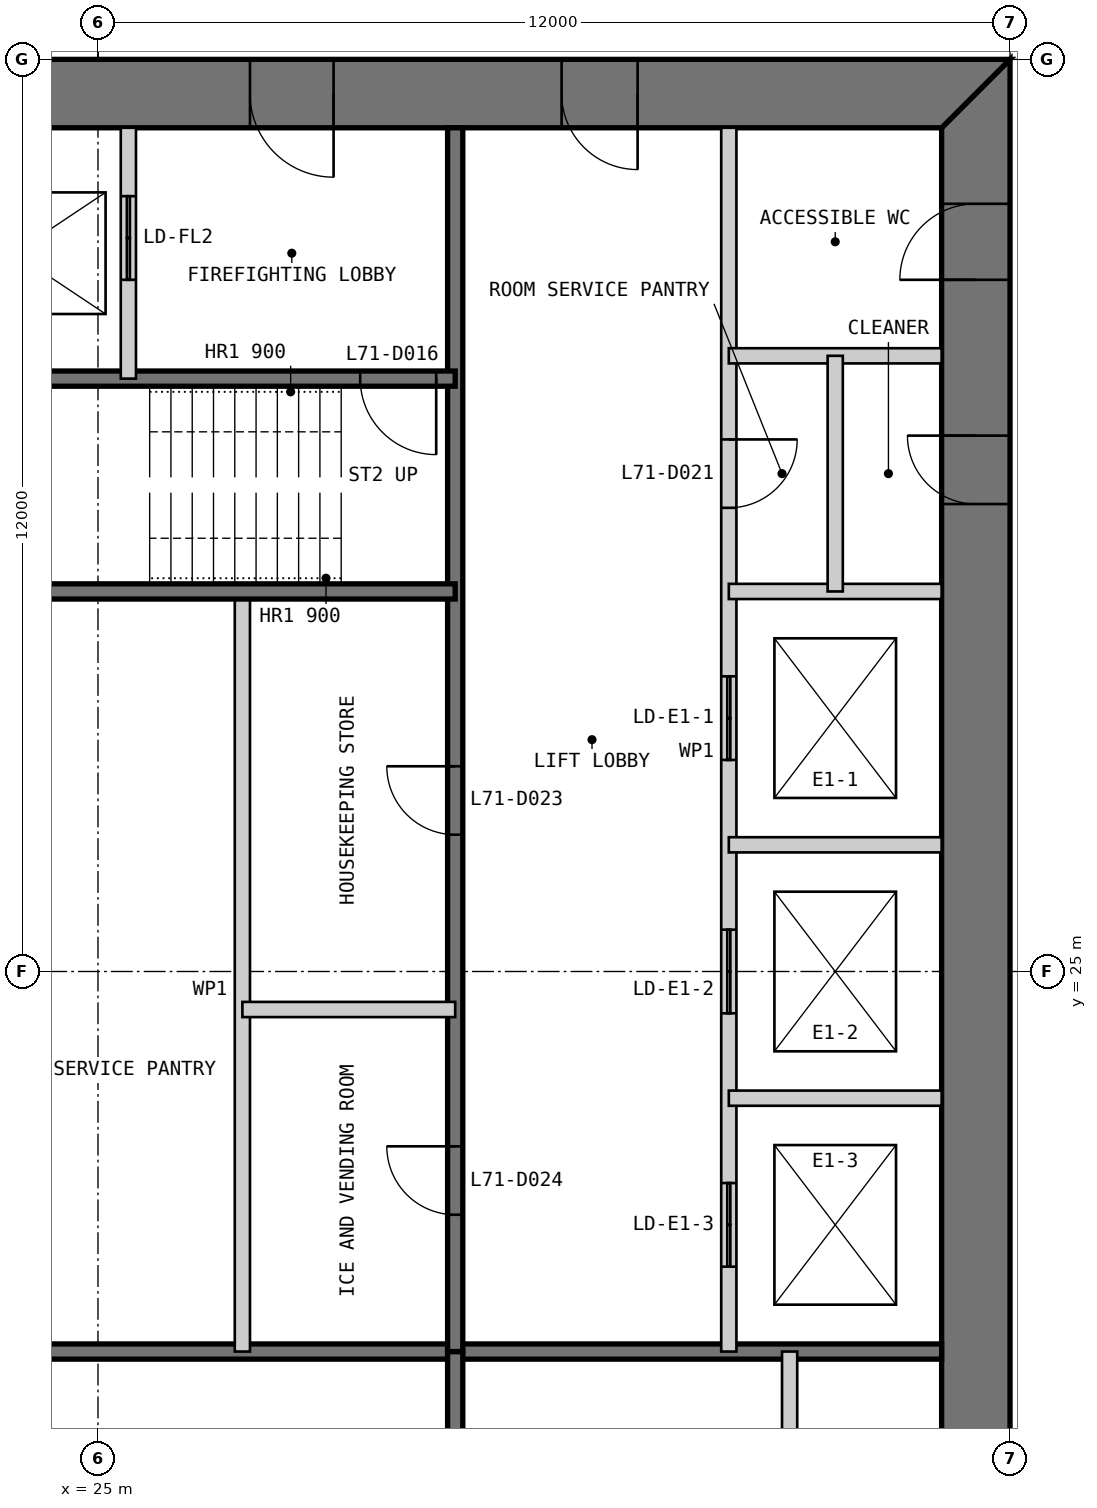
"""IFC4 building model, lengths in metres.
Left out: names, types, materials, properties, quantities, classifications, styles, units other than length and angle.
Written with IfcOpenShell. Run it as: python <this file> out.ifc"""

import sys

from ifc_helpers import new_model, si_unit, direction, frame, frame_2d, origin, place, context, subcontext, project, spatial, polyline, rectangle, outline, extrude, element, fill, save


model = new_model("IFC4")
c1 = context("Model", 3, precision=1e-05, world=origin(), true_north=direction((0.0, 1.0)))
c2 = subcontext(c1, "Body", "Model", "MODEL_VIEW")
j1 = project(units=[si_unit("LENGTHUNIT", "METRE"), si_unit("PLANEANGLEUNIT", "RADIAN")], contexts=[c1])
p1 = place(None, origin())
s1 = spatial("IfcSite", under=j1, at=p1, CompositionType="ELEMENT")
p2 = place(p1, origin())
s2 = spatial("IfcBuilding", under=s1, at=p2, CompositionType="ELEMENT")
p3 = place(p2, frame((0.0, 0.0, 293.4)))
s3 = spatial("IfcBuildingStorey", under=s2, at=p3, CompositionType="ELEMENT", Elevation=293.4)
p4 = place(p3, frame((36.55, 13.9, 0.0), z_axis=(0.0, 0.0, 1.0), x_axis=(0.0, 1.0, 0.0)))
e1 = element("IfcWall", 1, at=p4, inside=s3, PredefinedType="SHEAR", context=c2, shape_type="SweptSolid", body=[
    extrude(outline(polyline([(-0.9, -0.45), (23.1, -0.45), (22.2, 0.45), (0.0, 0.45), (-0.9, -0.45)])), origin(), (0.0, 0.0, 1.0), 3.4),
])
p5 = place(p4, frame((20.2, 0.0, 0.0)))
e2 = element("IfcOpeningElement", 2, at=p5, cuts=e1, PredefinedType="OPENING", context=c2, shape_type="SweptSolid", body=[
    extrude(rectangle(XDim=1.0, YDim=2.2, at=frame_2d((0.5, 1.1))), frame((0.0, 0.46, 0.0), z_axis=(0.0, -1.0, 0.0), x_axis=(1.0, 0.0, 0.0)), (0.0, 0.0, 1.0), 0.92),
])
p6 = place(p4, frame((17.25, 0.0, 0.0)))
e3 = element("IfcOpeningElement", 3, at=p6, cuts=e1, PredefinedType="OPENING", context=c2, shape_type="SweptSolid", body=[
    extrude(rectangle(XDim=0.9, YDim=2.2, at=frame_2d((0.45, 1.1))), frame((0.0, 0.46, 0.0), z_axis=(0.0, -1.0, 0.0), x_axis=(1.0, 0.0, 0.0)), (0.0, 0.0, 1.0), 0.92),
])
p7 = place(p3, frame((37.0, 36.55, 0.0), z_axis=(0.0, 0.0, 1.0), x_axis=(-1.0, 0.0, 0.0)))
e4 = element("IfcWall", 4, at=p7, inside=s3, PredefinedType="SHEAR", context=c2, shape_type="SweptSolid", body=[
    extrude(outline(polyline([(0.0, -0.45), (24.0, -0.45), (23.1, 0.45), (0.9, 0.45), (0.0, -0.45)])), origin(), (0.0, 0.0, 1.0), 3.4),
])
p8 = place(p7, frame((4.9, 0.0, 0.0)))
e5 = element("IfcOpeningElement", 5, at=p8, cuts=e4, PredefinedType="OPENING", context=c2, shape_type="SweptSolid", body=[
    extrude(rectangle(XDim=1.0, YDim=2.2, at=frame_2d((0.5, 1.1))), frame((0.0, 0.46, 0.0), z_axis=(0.0, -1.0, 0.0), x_axis=(1.0, 0.0, 0.0)), (0.0, 0.0, 1.0), 0.92),
])
p9 = place(p7, frame((8.9, 0.0, 0.0)))
e6 = element("IfcOpeningElement", 6, at=p9, cuts=e4, PredefinedType="OPENING", context=c2, shape_type="SweptSolid", body=[
    extrude(rectangle(XDim=1.1, YDim=2.2, at=frame_2d((0.55, 1.1))), frame((0.0, 0.46, 0.0), z_axis=(0.0, -1.0, 0.0), x_axis=(1.0, 0.0, 0.0)), (0.0, 0.0, 1.0), 0.92),
])
p10 = place(p7, frame((15.05, 0.0, 0.0)))
e7 = element("IfcOpeningElement", 7, at=p10, cuts=e4, PredefinedType="OPENING", context=c2, shape_type="SweptSolid", body=[
    extrude(rectangle(XDim=0.9, YDim=2.2, at=frame_2d((0.45, 1.1))), frame((0.0, 0.46, 0.0), z_axis=(0.0, -1.0, 0.0), x_axis=(1.0, 0.0, 0.0)), (0.0, 0.0, 1.0), 0.92),
])
p11 = place(p7, frame((17.9, 0.0, 0.0)))
e8 = element("IfcOpeningElement", 8, at=p11, cuts=e4, PredefinedType="OPENING", context=c2, shape_type="SweptSolid", body=[
    extrude(rectangle(XDim=1.0, YDim=2.2, at=frame_2d((0.5, 1.1))), frame((0.0, 0.46, 0.0), z_axis=(0.0, -1.0, 0.0), x_axis=(1.0, 0.0, 0.0)), (0.0, 0.0, 1.0), 0.92),
])
p12 = place(p7, frame((21.4, 0.0, 0.0)))
e9 = element("IfcOpeningElement", 9, at=p12, cuts=e4, PredefinedType="OPENING", context=c2, shape_type="SweptSolid", body=[
    extrude(rectangle(XDim=1.0, YDim=2.2, at=frame_2d((0.5, 1.1))), frame((0.0, 0.46, 0.0), z_axis=(0.0, -1.0, 0.0), x_axis=(1.0, 0.0, 0.0)), (0.0, 0.0, 1.0), 0.92),
])
p13 = place(p3, frame((20.3, 20.0, 0.0), z_axis=(0.0, 0.0, 1.0), x_axis=(1.0, 0.0, 0.0)))
e10 = element("IfcWall", 10, at=p13, inside=s3, PredefinedType="SOLIDWALL", context=c2, shape_type="SweptSolid", body=[
    extrude(rectangle(XDim=15.8, YDim=0.2, at=frame_2d((7.9, 0.0))), origin(), (0.0, 0.0, 1.0), 3.2),
])
p14 = place(p3, frame((29.7, 13.9, 0.0), z_axis=(0.0, 0.0, 1.0), x_axis=(0.0, 1.0, 0.0)))
e11 = element("IfcWall", 11, at=p14, inside=s3, PredefinedType="SOLIDWALL", context=c2, shape_type="SweptSolid", body=[
    extrude(rectangle(XDim=6.1, YDim=0.2, at=frame_2d((3.05, 0.0))), origin(), (0.0, 0.0, 1.0), 3.2),
])
p15 = place(p3, frame((34.1, 13.9, 0.0), z_axis=(0.0, 0.0, 1.0), x_axis=(0.0, 1.0, 0.0)))
e12 = element("IfcWall", 12, at=p15, inside=s3, PredefinedType="PARTITIONING", context=c2, shape_type="SweptSolid", body=[
    extrude(rectangle(XDim=6.1, YDim=0.2, at=frame_2d((3.05, 0.0))), origin(), (0.0, 0.0, 1.0), 3.2),
])
p16 = place(p3, frame((33.3, 36.1, 0.0), z_axis=(0.0, 0.0, 1.0), x_axis=(0.0, -1.0, 0.0)))
e13 = element("IfcWall", 13, at=p16, inside=s3, PredefinedType="PARTITIONING", context=c2, shape_type="SweptSolid", body=[
    extrude(rectangle(XDim=16.1, YDim=0.2, at=frame_2d((8.05, 0.0))), origin(), (0.0, 0.0, 1.0), 3.2),
])
p17 = place(p16, frame((4.1, 0.0, 0.0)))
e14 = element("IfcOpeningElement", 14, at=p17, cuts=e13, PredefinedType="OPENING", context=c2, shape_type="SweptSolid", body=[
    extrude(rectangle(XDim=0.9, YDim=2.2, at=frame_2d((0.45, 1.1))), frame((0.0, 0.11, 0.0), z_axis=(0.0, -1.0, 0.0), x_axis=(1.0, 0.0, 0.0)), (0.0, 0.0, 1.0), 0.22),
])
p18 = place(p16, frame((7.217, 0.0, 0.0)))
e15 = element("IfcOpeningElement", 15, at=p18, cuts=e13, PredefinedType="OPENING", context=c2, shape_type="SweptSolid", body=[
    extrude(rectangle(XDim=1.1, YDim=2.2, at=frame_2d((0.55, 1.1))), frame((0.0, 0.11, 0.0), z_axis=(0.0, -1.0, 0.0), x_axis=(1.0, 0.0, 0.0)), (0.0, 0.0, 1.0), 0.22),
])
p19 = place(p16, frame((10.55, 0.0, 0.0)))
e16 = element("IfcOpeningElement", 16, at=p19, cuts=e13, PredefinedType="OPENING", context=c2, shape_type="SweptSolid", body=[
    extrude(rectangle(XDim=1.1, YDim=2.2, at=frame_2d((0.55, 1.1))), frame((0.0, 0.11, 0.0), z_axis=(0.0, -1.0, 0.0), x_axis=(1.0, 0.0, 0.0)), (0.0, 0.0, 1.0), 0.22),
])
p20 = place(p16, frame((13.883, 0.0, 0.0)))
e17 = element("IfcOpeningElement", 17, at=p20, cuts=e13, PredefinedType="OPENING", context=c2, shape_type="SweptSolid", body=[
    extrude(rectangle(XDim=1.1, YDim=2.2, at=frame_2d((0.55, 1.1))), frame((0.0, 0.11, 0.0), z_axis=(0.0, -1.0, 0.0), x_axis=(1.0, 0.0, 0.0)), (0.0, 0.0, 1.0), 0.22),
])
p21 = place(p3, frame((29.7, 36.1, 0.0), z_axis=(0.0, 0.0, 1.0), x_axis=(0.0, -1.0, 0.0)))
e18 = element("IfcWall", 18, at=p21, inside=s3, PredefinedType="SOLIDWALL", context=c2, shape_type="SweptSolid", body=[
    extrude(rectangle(XDim=16.1, YDim=0.2, at=frame_2d((8.05, 0.0))), origin(), (0.0, 0.0, 1.0), 3.2),
])
p22 = place(p21, frame((8.4, 0.0, 0.0)))
e19 = element("IfcOpeningElement", 19, at=p22, cuts=e18, PredefinedType="OPENING", context=c2, shape_type="SweptSolid", body=[
    extrude(rectangle(XDim=0.9, YDim=2.2, at=frame_2d((0.45, 1.1))), frame((0.0, 0.11, 0.0), z_axis=(0.0, -1.0, 0.0), x_axis=(1.0, 0.0, 0.0)), (0.0, 0.0, 1.0), 0.22),
])
p23 = place(p21, frame((13.4, 0.0, 0.0)))
e20 = element("IfcOpeningElement", 20, at=p23, cuts=e18, PredefinedType="OPENING", context=c2, shape_type="SweptSolid", body=[
    extrude(rectangle(XDim=0.9, YDim=2.2, at=frame_2d((0.45, 1.1))), frame((0.0, 0.11, 0.0), z_axis=(0.0, -1.0, 0.0), x_axis=(1.0, 0.0, 0.0)), (0.0, 0.0, 1.0), 0.22),
])
for number, where, z_axis, x_axis in (
    (21, (36.1, 30.0, 0.0), (0.0, 0.0, 1.0), (-1.0, 0.0, 0.0)),
    (22, (36.1, 26.667, 0.0), (0.0, 0.0, 1.0), (-1.0, 0.0, 0.0)),
    (23, (36.1, 23.333, 0.0), (0.0, 0.0, 1.0), (-1.0, 0.0, 0.0)),
):
    element("IfcWall", number, at=place(p3, frame(where, z_axis=z_axis, x_axis=x_axis)), inside=s3, PredefinedType="PARTITIONING", context=c2, shape_type="SweptSolid", body=[
        extrude(rectangle(XDim=2.8, YDim=0.2, at=frame_2d((1.4, 0.0))), origin(), (0.0, 0.0, 1.0), 3.2),
    ])
p24 = place(p3, frame((26.9, 30.0, 0.0), z_axis=(0.0, 0.0, 1.0), x_axis=(0.0, -1.0, 0.0)))
e24 = element("IfcWall", 24, at=p24, inside=s3, PredefinedType="PARTITIONING", context=c2, shape_type="SweptSolid", body=[
    extrude(rectangle(XDim=10.0, YDim=0.2, at=frame_2d((5.0, 0.0))), origin(), (0.0, 0.0, 1.0), 3.2),
])
p25 = place(p3, frame((29.7, 32.8, 0.0), z_axis=(0.0, 0.0, 1.0), x_axis=(-1.0, 0.0, 0.0)))
e25 = element("IfcWall", 25, at=p25, inside=s3, PredefinedType="SOLIDWALL", context=c2, shape_type="SweptSolid", body=[
    extrude(rectangle(XDim=9.4, YDim=0.2, at=frame_2d((4.7, 0.0))), origin(), (0.0, 0.0, 1.0), 3.2),
])
p26 = place(p25, frame((0.25, 0.0, 0.0)))
e26 = element("IfcOpeningElement", 26, at=p26, cuts=e25, PredefinedType="OPENING", context=c2, shape_type="SweptSolid", body=[
    extrude(rectangle(XDim=1.0, YDim=2.2, at=frame_2d((0.5, 1.1))), frame((0.0, 0.11, 0.0), z_axis=(0.0, -1.0, 0.0), x_axis=(1.0, 0.0, 0.0)), (0.0, 0.0, 1.0), 0.22),
])
p27 = place(p3, frame((29.7, 30.0, 0.0), z_axis=(0.0, 0.0, 1.0), x_axis=(-1.0, 0.0, 0.0)))
e27 = element("IfcWall", 27, at=p27, inside=s3, PredefinedType="SOLIDWALL", context=c2, shape_type="SweptSolid", body=[
    extrude(rectangle(XDim=15.8, YDim=0.2, at=frame_2d((7.9, 0.0))), origin(), (0.0, 0.0, 1.0), 3.2),
])
p28 = place(p3, frame((25.4, 36.1, 0.0), z_axis=(0.0, 0.0, 1.0), x_axis=(0.0, -1.0, 0.0)))
e28 = element("IfcWall", 28, at=p28, inside=s3, PredefinedType="PARTITIONING", context=c2, shape_type="SweptSolid", body=[
    extrude(rectangle(XDim=3.3, YDim=0.2, at=frame_2d((1.65, 0.0))), origin(), (0.0, 0.0, 1.0), 3.2),
])
p29 = place(p28, frame((0.9, 0.0, 0.0)))
e29 = element("IfcOpeningElement", 29, at=p29, cuts=e28, PredefinedType="OPENING", context=c2, shape_type="SweptSolid", body=[
    extrude(rectangle(XDim=1.1, YDim=2.2, at=frame_2d((0.55, 1.1))), frame((0.0, 0.11, 0.0), z_axis=(0.0, -1.0, 0.0), x_axis=(1.0, 0.0, 0.0)), (0.0, 0.0, 1.0), 0.22),
])
p30 = place(p3, frame((36.1, 33.1, 0.0), z_axis=(0.0, 0.0, 1.0), x_axis=(-1.0, 0.0, 0.0)))
e30 = element("IfcWall", 30, at=p30, inside=s3, PredefinedType="PARTITIONING", context=c2, shape_type="SweptSolid", body=[
    extrude(rectangle(XDim=2.8, YDim=0.2, at=frame_2d((1.4, 0.0))), origin(), (0.0, 0.0, 1.0), 3.2),
])
p31 = place(p3, frame((34.7, 33.1, 0.0), z_axis=(0.0, 0.0, 1.0), x_axis=(0.0, -1.0, 0.0)))
e31 = element("IfcWall", 31, at=p31, inside=s3, PredefinedType="PARTITIONING", context=c2, shape_type="SweptSolid", body=[
    extrude(rectangle(XDim=3.1, YDim=0.2, at=frame_2d((1.55, 0.0))), origin(), (0.0, 0.0, 1.0), 3.2),
])
p32 = place(p3, frame((29.7, 24.5, 0.0), z_axis=(0.0, 0.0, 1.0), x_axis=(-1.0, 0.0, 0.0)))
e32 = element("IfcWall", 32, at=p32, inside=s3, PredefinedType="PARTITIONING", context=c2, shape_type="SweptSolid", body=[
    extrude(rectangle(XDim=2.8, YDim=0.2, at=frame_2d((1.4, 0.0))), origin(), (0.0, 0.0, 1.0), 3.2),
])
p33 = place(p8, origin())
e33 = element("IfcDoor", 33, at=p33, inside=s3, OperationType="SINGLE_SWING_LEFT", PredefinedType="DOOR", context=c2, shape_type="SweptSolid", body=[
    extrude(rectangle(XDim=1.0, YDim=2.2, at=frame_2d((0.5, 1.1))), frame((0.0, 0.025, 0.0), z_axis=(0.0, -1.0, 0.0), x_axis=(1.0, 0.0, 0.0)), (0.0, 0.0, 1.0), 0.05),
    extrude(outline(polyline([(0.0, 0.0), (0.04, 0.0), (0.04, 2.16), (0.96, 2.16), (0.96, 0.0), (1.0, 0.0), (1.0, 2.2), (0.0, 2.2), (0.0, 0.0)])), frame((0.0, 0.3, 0.0), z_axis=(0.0, -1.0, 0.0), x_axis=(1.0, 0.0, 0.0)), (0.0, 0.0, 1.0), 0.6),
])
fill(e5, e33)
p34 = place(p9, origin())
e34 = element("IfcDoor", 34, at=p34, inside=s3, OperationType="SINGLE_SWING_LEFT", PredefinedType="DOOR", context=c2, shape_type="SweptSolid", body=[
    extrude(rectangle(XDim=1.1, YDim=2.2, at=frame_2d((0.55, 1.1))), frame((0.0, 0.025, 0.0), z_axis=(0.0, -1.0, 0.0), x_axis=(1.0, 0.0, 0.0)), (0.0, 0.0, 1.0), 0.05),
    extrude(outline(polyline([(0.0, 0.0), (0.04, 0.0), (0.04, 2.16), (1.06, 2.16), (1.06, 0.0), (1.1, 0.0), (1.1, 2.2), (0.0, 2.2), (0.0, 0.0)])), frame((0.0, 0.3, 0.0), z_axis=(0.0, -1.0, 0.0), x_axis=(1.0, 0.0, 0.0)), (0.0, 0.0, 1.0), 0.6),
])
fill(e6, e34)
p35 = place(p26, origin())
e35 = element("IfcDoor", 35, at=p35, inside=s3, OperationType="SINGLE_SWING_LEFT", PredefinedType="DOOR", context=c2, shape_type="SweptSolid", body=[
    extrude(rectangle(XDim=1.0, YDim=2.2, at=frame_2d((0.5, 1.1))), frame((0.0, 0.025, 0.0), z_axis=(0.0, -1.0, 0.0), x_axis=(1.0, 0.0, 0.0)), (0.0, 0.0, 1.0), 0.05),
])
fill(e26, e35)
p36 = place(p5, origin())
e36 = element("IfcDoor", 36, at=p36, inside=s3, OperationType="SINGLE_SWING_LEFT", PredefinedType="DOOR", context=c2, shape_type="SweptSolid", body=[
    extrude(rectangle(XDim=1.0, YDim=2.2, at=frame_2d((0.5, 1.1))), frame((0.0, 0.025, 0.0), z_axis=(0.0, -1.0, 0.0), x_axis=(1.0, 0.0, 0.0)), (0.0, 0.0, 1.0), 0.05),
    extrude(outline(polyline([(0.0, 0.0), (0.04, 0.0), (0.04, 2.16), (0.96, 2.16), (0.96, 0.0), (1.0, 0.0), (1.0, 2.2), (0.0, 2.2), (0.0, 0.0)])), frame((0.0, 0.3, 0.0), z_axis=(0.0, -1.0, 0.0), x_axis=(1.0, 0.0, 0.0)), (0.0, 0.0, 1.0), 0.6),
])
fill(e2, e36)
p37 = place(p17, origin())
e37 = element("IfcDoor", 37, at=p37, inside=s3, OperationType="SINGLE_SWING_LEFT", PredefinedType="DOOR", context=c2, shape_type="SweptSolid", body=[
    extrude(rectangle(XDim=0.9, YDim=2.2, at=frame_2d((0.45, 1.1))), frame((0.0, 0.025, 0.0), z_axis=(0.0, -1.0, 0.0), x_axis=(1.0, 0.0, 0.0)), (0.0, 0.0, 1.0), 0.05),
])
fill(e14, e37)
p38 = place(p6, origin())
e38 = element("IfcDoor", 38, at=p38, inside=s3, OperationType="SINGLE_SWING_RIGHT", PredefinedType="DOOR", context=c2, shape_type="SweptSolid", body=[
    extrude(rectangle(XDim=0.9, YDim=2.2, at=frame_2d((0.45, 1.1))), frame((0.0, 0.025, 0.0), z_axis=(0.0, -1.0, 0.0), x_axis=(1.0, 0.0, 0.0)), (0.0, 0.0, 1.0), 0.05),
    extrude(outline(polyline([(0.0, 0.0), (0.04, 0.0), (0.04, 2.16), (0.86, 2.16), (0.86, 0.0), (0.9, 0.0), (0.9, 2.2), (0.0, 2.2), (0.0, 0.0)])), frame((0.0, 0.3, 0.0), z_axis=(0.0, -1.0, 0.0), x_axis=(1.0, 0.0, 0.0)), (0.0, 0.0, 1.0), 0.6),
])
fill(e3, e38)
p39 = place(p22, frame((0.9, 0.0, 0.0), z_axis=(0.0, 0.0, 1.0), x_axis=(-1.0, 0.0, 0.0)))
e39 = element("IfcDoor", 39, at=p39, inside=s3, OperationType="SINGLE_SWING_RIGHT", PredefinedType="DOOR", context=c2, shape_type="SweptSolid", body=[
    extrude(rectangle(XDim=0.9, YDim=2.2, at=frame_2d((0.45, 1.1))), frame((0.0, 0.025, 0.0), z_axis=(0.0, -1.0, 0.0), x_axis=(1.0, 0.0, 0.0)), (0.0, 0.0, 1.0), 0.05),
])
fill(e19, e39)
p40 = place(p23, frame((0.9, 0.0, 0.0), z_axis=(0.0, 0.0, 1.0), x_axis=(-1.0, 0.0, 0.0)))
e40 = element("IfcDoor", 40, at=p40, inside=s3, OperationType="SINGLE_SWING_RIGHT", PredefinedType="DOOR", context=c2, shape_type="SweptSolid", body=[
    extrude(rectangle(XDim=0.9, YDim=2.2, at=frame_2d((0.45, 1.1))), frame((0.0, 0.025, 0.0), z_axis=(0.0, -1.0, 0.0), x_axis=(1.0, 0.0, 0.0)), (0.0, 0.0, 1.0), 0.05),
])
fill(e20, e40)
p41 = place(p29, origin())
e41 = element("IfcDoor", 41, at=p41, inside=s3, OperationType="DOUBLE_DOOR_SLIDING", PredefinedType="DOOR", context=c2, shape_type="SweptSolid", body=[
    extrude(rectangle(XDim=1.1, YDim=2.2, at=frame_2d((0.55, 1.1))), frame((0.0, 0.025, 0.0), z_axis=(0.0, -1.0, 0.0), x_axis=(1.0, 0.0, 0.0)), (0.0, 0.0, 1.0), 0.05),
])
fill(e29, e41)
p42 = place(p18, origin())
e42 = element("IfcDoor", 42, at=p42, inside=s3, OperationType="DOUBLE_DOOR_SLIDING", PredefinedType="DOOR", context=c2, shape_type="SweptSolid", body=[
    extrude(rectangle(XDim=1.1, YDim=2.2, at=frame_2d((0.55, 1.1))), frame((0.0, 0.025, 0.0), z_axis=(0.0, -1.0, 0.0), x_axis=(1.0, 0.0, 0.0)), (0.0, 0.0, 1.0), 0.05),
])
fill(e15, e42)
p43 = place(p19, origin())
e43 = element("IfcDoor", 43, at=p43, inside=s3, OperationType="DOUBLE_DOOR_SLIDING", PredefinedType="DOOR", context=c2, shape_type="SweptSolid", body=[
    extrude(rectangle(XDim=1.1, YDim=2.2, at=frame_2d((0.55, 1.1))), frame((0.0, 0.025, 0.0), z_axis=(0.0, -1.0, 0.0), x_axis=(1.0, 0.0, 0.0)), (0.0, 0.0, 1.0), 0.05),
])
fill(e16, e43)
p44 = place(p20, origin())
e44 = element("IfcDoor", 44, at=p44, inside=s3, OperationType="DOUBLE_DOOR_SLIDING", PredefinedType="DOOR", context=c2, shape_type="SweptSolid", body=[
    extrude(rectangle(XDim=1.1, YDim=2.2, at=frame_2d((0.55, 1.1))), frame((0.0, 0.025, 0.0), z_axis=(0.0, -1.0, 0.0), x_axis=(1.0, 0.0, 0.0)), (0.0, 0.0, 1.0), 0.05),
])
fill(e17, e44)
save(model, sys.argv[1])
